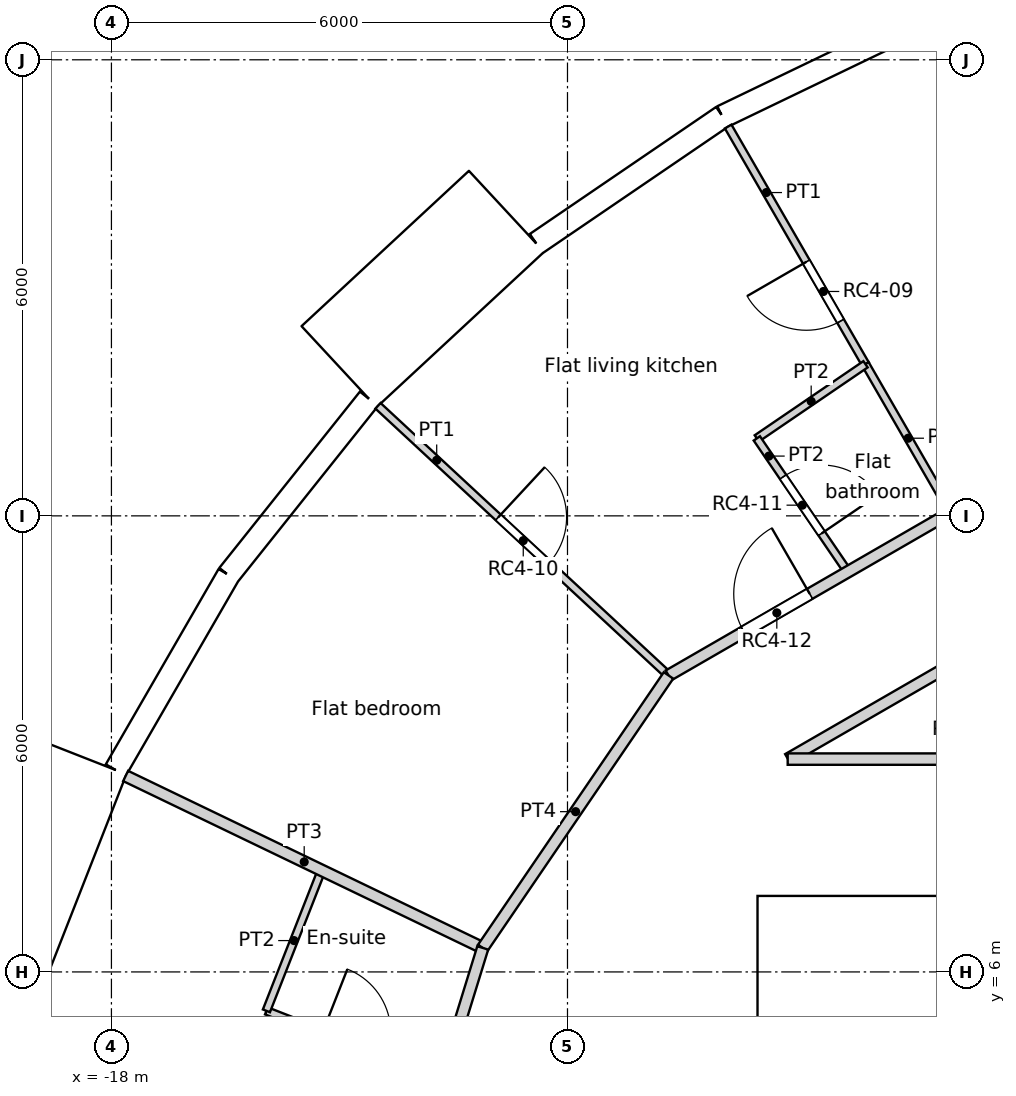
"""IFC4 building model, lengths in metres.
Left out: names, types, materials, properties, quantities, classifications, styles, units other than length and angle.
Written with IfcOpenShell. Run it as: python <this file> out.ifc"""

import sys

from ifc_helpers import new_model, si_unit, direction, frame, frame_2d, origin, origin_2d, place, context, subcontext, project, spatial, rectangle, circle, extrude, element, fill, save


model = new_model("IFC4")
c1 = context("Model", 3, precision=1e-05, world=origin(), true_north=direction((0.0, 1.0)))
c2 = subcontext(c1, "Body", "Model", "MODEL_VIEW")
j1 = project(units=[si_unit("LENGTHUNIT", "METRE"), si_unit("PLANEANGLEUNIT", "RADIAN")], contexts=[c1])
p1 = place(None, origin())
s1 = spatial("IfcSite", under=j1, at=p1, CompositionType="ELEMENT")
p2 = place(p1, origin())
s2 = spatial("IfcBuilding", under=s1, at=p2, CompositionType="ELEMENT")
p3 = place(p2, frame((0.0, 0.0, 263.4)))
s3 = spatial("IfcBuildingStorey", under=s2, at=p3, CompositionType="ELEMENT", Elevation=263.4)
for number, where, z_axis, x_axis in (
    (1, (-9.411, 16.301, 0.0), (0.0, 0.0, 1.0), (1.0, 0.0, 0.0)),
    (2, (-13.798, 12.802, 0.0), (0.0, 0.0, 1.0), (1.0, 0.0, 0.0)),
    (3, (-16.958, 8.167, 0.0), (0.0, 0.0, 1.0), (1.0, 0.0, 0.0)),
):
    element("IfcColumn", number, at=place(p3, frame(where, z_axis=z_axis, x_axis=x_axis)), inside=s3, PredefinedType="COLUMN", context=c2, shape_type="SweptSolid", body=[
        extrude(circle(Radius=0.55, at=origin_2d()), origin(), (0.0, 0.0, 1.0), 3.6),
    ])
p4 = place(p3, frame((-7.292, 18.538, 0.0), z_axis=(0.0, 0.0, 1.0), x_axis=(-0.90095513435, -0.433912255978, 0.0)))
e4 = element("IfcWall", 4, at=p4, inside=s3, PredefinedType="SOLIDWALL", context=c2, shape_type="SweptSolid", body=[
    extrude(rectangle(XDim=2.962, YDim=0.3, at=frame_2d((1.481, 0.0))), origin(), (0.0, 0.0, 1.0), 3.25),
])
p5 = place(p4, frame((1.481, 0.0, 1.55)))
e5 = element("IfcOpeningElement", 5, at=p5, cuts=e4, PredefinedType="OPENING", context=c2, shape_type="SweptSolid", body=[
    extrude(circle(Radius=0.9, at=origin_2d()), frame((0.0, 0.16, 0.0), z_axis=(0.0, -1.0, 0.0), x_axis=(1.0, 0.0, 0.0)), (0.0, 0.0, 1.0), 0.32),
])
p6 = place(p3, frame((-9.961, 17.253, 0.0), z_axis=(0.0, 0.0, 1.0), x_axis=(-0.826236061068, -0.563324037646, 0.0)))
e6 = element("IfcWall", 6, at=p6, inside=s3, PredefinedType="SOLIDWALL", context=c2, shape_type="SweptSolid", body=[
    extrude(rectangle(XDim=2.962, YDim=0.3, at=frame_2d((1.481, 0.0))), origin(), (0.0, 0.0, 1.0), 3.25),
])
p7 = place(p6, frame((1.481, 0.0, 1.55)))
e7 = element("IfcOpeningElement", 7, at=p7, cuts=e6, PredefinedType="OPENING", context=c2, shape_type="SweptSolid", body=[
    extrude(circle(Radius=0.9, at=origin_2d()), frame((0.0, 0.16, 0.0), z_axis=(0.0, -1.0, 0.0), x_axis=(1.0, 0.0, 0.0)), (0.0, 0.0, 1.0), 0.32),
])
p8 = place(p3, frame((-12.804, 16.005, -0.35), z_axis=(0.0, 0.0, 1.0), x_axis=(-0.733022439167, -0.680204457261, 0.0)))
e8 = element("IfcWall", 8, at=p8, inside=s3, PredefinedType="ELEMENTEDWALL", context=c2, shape_type="SweptSolid", body=[
    extrude(rectangle(XDim=3.0, YDim=1.45, at=frame_2d((1.5, 0.0))), origin(), (0.0, 0.0, 1.0), 3.6),
])
p9 = place(p8, frame((1.5, 0.0, 1.9)))
e9 = element("IfcOpeningElement", 9, at=p9, cuts=e8, PredefinedType="OPENING", context=c2, shape_type="SweptSolid", body=[
    extrude(circle(Radius=0.9, at=origin_2d()), frame((0.0, 0.735, 0.0), z_axis=(0.0, -1.0, 0.0), x_axis=(1.0, 0.0, 0.0)), (0.0, 0.0, 1.0), 1.47),
])
p10 = place(p3, frame((-14.613, 13.538, 0.0), z_axis=(0.0, 0.0, 1.0), x_axis=(-0.623498236992, -0.781824755599, 0.0)))
e10 = element("IfcWall", 10, at=p10, inside=s3, PredefinedType="SOLIDWALL", context=c2, shape_type="SweptSolid", body=[
    extrude(rectangle(XDim=2.962, YDim=0.3, at=frame_2d((1.481, 0.0))), origin(), (0.0, 0.0, 1.0), 3.25),
])
p11 = place(p10, frame((1.481, 0.0, 1.55)))
e11 = element("IfcOpeningElement", 11, at=p11, cuts=e10, PredefinedType="OPENING", context=c2, shape_type="SweptSolid", body=[
    extrude(circle(Radius=0.9, at=origin_2d()), frame((0.0, 0.16, 0.0), z_axis=(0.0, -1.0, 0.0), x_axis=(1.0, 0.0, 0.0)), (0.0, 0.0, 1.0), 0.32),
])
p12 = place(p3, frame((-16.46, 11.222, 0.0), z_axis=(0.0, 0.0, 1.0), x_axis=(-0.499950756475, -0.86605383268, 0.0)))
e12 = element("IfcWall", 12, at=p12, inside=s3, PredefinedType="SOLIDWALL", context=c2, shape_type="SweptSolid", body=[
    extrude(rectangle(XDim=2.962, YDim=0.3, at=frame_2d((1.481, 0.0))), origin(), (0.0, 0.0, 1.0), 3.25),
])
p13 = place(p12, frame((1.481, 0.0, 1.55)))
e13 = element("IfcOpeningElement", 13, at=p13, cuts=e12, PredefinedType="OPENING", context=c2, shape_type="SweptSolid", body=[
    extrude(circle(Radius=0.9, at=origin_2d()), frame((0.0, 0.16, 0.0), z_axis=(0.0, -1.0, 0.0), x_axis=(1.0, 0.0, 0.0)), (0.0, 0.0, 1.0), 0.32),
])
p14 = place(p3, frame((-18.48, 8.864, -0.35), z_axis=(0.0, 0.0, 1.0), x_axis=(-0.36537792632, -0.93085926485, 0.0)))
e14 = element("IfcWall", 14, at=p14, inside=s3, PredefinedType="ELEMENTEDWALL", context=c2, shape_type="SweptSolid", body=[
    extrude(rectangle(XDim=3.0, YDim=1.45, at=frame_2d((1.5, 0.0))), origin(), (0.0, 0.0, 1.0), 3.6),
])
p15 = place(p14, frame((1.5, 0.0, 1.9)))
e15 = element("IfcOpeningElement", 15, at=p15, cuts=e14, PredefinedType="OPENING", context=c2, shape_type="SweptSolid", body=[
    extrude(circle(Radius=0.9, at=origin_2d()), frame((0.0, 0.735, 0.0), z_axis=(0.0, -1.0, 0.0), x_axis=(1.0, 0.0, 0.0)), (0.0, 0.0, 1.0), 1.47),
])
p16 = place(p3, frame((-9.5, 6.7, 0.0), z_axis=(0.0, 0.0, 1.0), x_axis=(1.0, 0.0, 0.0)))
e16 = element("IfcWall", 16, at=p16, inside=s3, PredefinedType="SOLIDWALL", context=c2, shape_type="SweptSolid", body=[
    extrude(rectangle(XDim=19.0, YDim=0.6, at=frame_2d((9.5, 0.0))), origin(), (0.0, 0.0, 1.0), 3.6),
])
p17 = place(p16, frame((5.35, 0.0, 0.0)))
e17 = element("IfcOpeningElement", 17, at=p17, cuts=e16, PredefinedType="OPENING", context=c2, shape_type="SweptSolid", body=[
    extrude(rectangle(XDim=1.7, YDim=2.1, at=frame_2d((0.85, 1.05))), frame((0.0, 0.3, 0.0), z_axis=(0.0, -1.0, 0.0), x_axis=(1.0, 0.0, 0.0)), (0.0, 0.0, 1.0), 0.6),
])
p18 = place(p3, frame((-9.2, -6.4, 0.0), z_axis=(0.0, 0.0, 1.0), x_axis=(0.0, 1.0, 0.0)))
e18 = element("IfcWall", 18, at=p18, inside=s3, PredefinedType="SOLIDWALL", context=c2, shape_type="SweptSolid", body=[
    extrude(rectangle(XDim=12.8, YDim=0.6, at=frame_2d((6.4, 0.0))), origin(), (0.0, 0.0, 1.0), 3.6),
])
p19 = place(p3, frame((-9.103, 8.8, 0.0), z_axis=(0.0, 0.0, 1.0), x_axis=(1.0, 0.0, 0.0)))
e19 = element("IfcWall", 19, at=p19, inside=s3, PredefinedType="PARTITIONING", context=c2, shape_type="SweptSolid", body=[
    extrude(rectangle(XDim=9.663, YDim=0.15, at=frame_2d((4.832, 0.0))), origin(), (0.0, 0.0, 1.0), 3.25),
])
p20 = place(p19, frame((4.332, 0.0, 0.0)))
e20 = element("IfcOpeningElement", 20, at=p20, cuts=e19, PredefinedType="OPENING", context=c2, shape_type="SweptSolid", body=[
    extrude(rectangle(XDim=1.0, YDim=2.04, at=frame_2d((0.5, 1.02))), frame((0.0, 0.075, 0.0), z_axis=(0.0, -1.0, 0.0), x_axis=(1.0, 0.0, 0.0)), (0.0, 0.0, 1.0), 0.15),
])
p21 = place(p3, frame((-9.099, 8.801, 0.0), z_axis=(0.0, 0.0, 1.0), x_axis=(0.866068593998, 0.499925184894, 0.0)))
e21 = element("IfcWall", 21, at=p21, inside=s3, PredefinedType="PARTITIONING", context=c2, shape_type="SweptSolid", body=[
    extrude(rectangle(XDim=6.741, YDim=0.15, at=frame_2d((3.371, 0.0))), origin(), (0.0, 0.0, 1.0), 3.25),
])
p22 = place(p3, frame((-10.671, 9.901, 0.0), z_axis=(0.0, 0.0, 1.0), x_axis=(0.866021669971, 0.500006467099, 0.0)))
e22 = element("IfcWall", 22, at=p22, inside=s3, PredefinedType="PARTITIONING", context=c2, shape_type="SweptSolid", body=[
    extrude(rectangle(XDim=8.582, YDim=0.15, at=frame_2d((4.291, 0.0))), origin(), (0.0, 0.0, 1.0), 3.25),
])
p23 = place(p22, frame((1.146, 0.0, 0.0)))
e23 = element("IfcOpeningElement", 23, at=p23, cuts=e22, PredefinedType="OPENING", context=c2, shape_type="SweptSolid", body=[
    extrude(rectangle(XDim=1.0, YDim=2.1, at=frame_2d((0.5, 1.05))), frame((0.0, 0.075, 0.0), z_axis=(0.0, -1.0, 0.0), x_axis=(1.0, 0.0, 0.0)), (0.0, 0.0, 1.0), 0.15),
])
p24 = place(p3, frame((-13.115, 6.316, 0.0), z_axis=(0.0, 0.0, 1.0), x_axis=(0.563305396331, 0.826248770325, 0.0)))
e24 = element("IfcWall", 24, at=p24, inside=s3, PredefinedType="PARTITIONING", context=c2, shape_type="SweptSolid", body=[
    extrude(rectangle(XDim=4.339, YDim=0.15, at=frame_2d((2.169, 0.0))), origin(), (0.0, 0.0, 1.0), 3.25),
])
p25 = place(p3, frame((-14.394, 2.17, 0.0), z_axis=(0.0, 0.0, 1.0), x_axis=(0.294793541578, 0.955560970239, 0.0)))
e25 = element("IfcWall", 25, at=p25, inside=s3, PredefinedType="PARTITIONING", context=c2, shape_type="SweptSolid", body=[
    extrude(rectangle(XDim=4.339, YDim=0.15, at=frame_2d((2.169, 0.0))), origin(), (0.0, 0.0, 1.0), 3.25),
])
p26 = place(p25, frame((0.82, 0.0, 0.0)))
e26 = element("IfcOpeningElement", 26, at=p26, cuts=e25, PredefinedType="OPENING", context=c2, shape_type="SweptSolid", body=[
    extrude(rectangle(XDim=1.0, YDim=2.1, at=frame_2d((0.5, 1.05))), frame((0.0, 0.075, 0.0), z_axis=(0.0, -1.0, 0.0), x_axis=(1.0, 0.0, 0.0)), (0.0, 0.0, 1.0), 0.15),
])
p27 = place(p3, frame((-9.886, 17.122, 0.0), z_axis=(0.0, 0.0, 1.0), x_axis=(0.500172881213, -0.865925567759, 0.0)))
e27 = element("IfcWall", 27, at=p27, inside=s3, PredefinedType="PARTITIONING", context=c2, shape_type="SweptSolid", body=[
    extrude(rectangle(XDim=3.613, YDim=0.1, at=frame_2d((1.806, 0.0))), origin(), (0.0, 0.0, 1.0), 3.25),
])
p28 = place(p27, frame((2.056, 0.0, 0.0)))
e28 = element("IfcOpeningElement", 28, at=p28, cuts=e27, PredefinedType="OPENING", context=c2, shape_type="SweptSolid", body=[
    extrude(rectangle(XDim=0.9, YDim=2.1, at=frame_2d((0.45, 1.05))), frame((0.0, 0.05, 0.0), z_axis=(0.0, -1.0, 0.0), x_axis=(1.0, 0.0, 0.0)), (0.0, 0.0, 1.0), 0.1),
])
p29 = place(p3, frame((-14.493, 13.448, 0.0), z_axis=(0.0, 0.0, 1.0), x_axis=(0.732975231717, -0.680255326836, 0.0)))
e29 = element("IfcWall", 29, at=p29, inside=s3, PredefinedType="PARTITIONING", context=c2, shape_type="SweptSolid", body=[
    extrude(rectangle(XDim=5.214, YDim=0.1, at=frame_2d((2.607, 0.0))), origin(), (0.0, 0.0, 1.0), 3.25),
])
p30 = place(p29, frame((2.157, 0.0, 0.0)))
e30 = element("IfcOpeningElement", 30, at=p30, cuts=e29, PredefinedType="OPENING", context=c2, shape_type="SweptSolid", body=[
    extrude(rectangle(XDim=0.9, YDim=2.1, at=frame_2d((0.45, 1.05))), frame((0.0, 0.05, 0.0), z_axis=(0.0, -1.0, 0.0), x_axis=(1.0, 0.0, 0.0)), (0.0, 0.0, 1.0), 0.1),
])
p31 = place(p3, frame((-9.509, 13.019, 0.0), z_axis=(0.0, 0.0, 1.0), x_axis=(0.826254203104, 0.563297427522, 0.0)))
e31 = element("IfcWall", 31, at=p31, inside=s3, PredefinedType="PARTITIONING", context=c2, shape_type="SweptSolid", body=[
    extrude(rectangle(XDim=1.731, YDim=0.1, at=frame_2d((0.865, 0.0))), origin(), (0.0, 0.0, 1.0), 3.25),
])
p32 = place(p3, frame((-9.509, 13.019, 0.0), z_axis=(0.0, 0.0, 1.0), x_axis=(0.563233448692, -0.826297816937, 0.0)))
e32 = element("IfcWall", 32, at=p32, inside=s3, PredefinedType="PARTITIONING", context=c2, shape_type="SweptSolid", body=[
    extrude(rectangle(XDim=2.125, YDim=0.1, at=frame_2d((1.062, 0.0))), origin(), (0.0, 0.0, 1.0), 3.25),
])
p33 = place(p32, frame((0.613, 0.0, 0.0)))
e33 = element("IfcOpeningElement", 33, at=p33, cuts=e32, PredefinedType="OPENING", context=c2, shape_type="SweptSolid", body=[
    extrude(rectangle(XDim=0.9, YDim=2.0, at=frame_2d((0.45, 1.0))), frame((0.0, 0.05, 0.0), z_axis=(0.0, -1.0, 0.0), x_axis=(1.0, 0.0, 0.0)), (0.0, 0.0, 1.0), 0.1),
])
p34 = place(p3, frame((-8.081, 13.997, 0.0), z_axis=(0.0, 0.0, 1.0), x_axis=(0.49982252503, -0.866127844762, 0.0)))
e34 = element("IfcWall", 34, at=p34, inside=s3, PredefinedType="PARTITIONING", context=c2, shape_type="SweptSolid", body=[
    extrude(rectangle(XDim=2.253, YDim=0.1, at=frame_2d((1.126, 0.0))), origin(), (0.0, 0.0, 1.0), 3.25),
])
p35 = place(p3, frame((-17.813, 8.578, 0.0), z_axis=(0.0, 0.0, 1.0), x_axis=(0.901040981828, -0.433733961164, 0.0)))
e35 = element("IfcWall", 35, at=p35, inside=s3, PredefinedType="PARTITIONING", context=c2, shape_type="SweptSolid", body=[
    extrude(rectangle(XDim=5.214, YDim=0.15, at=frame_2d((2.607, 0.0))), origin(), (0.0, 0.0, 1.0), 3.25),
])
p36 = place(p3, frame((-15.961, 5.488, 0.0), z_axis=(0.0, 0.0, 1.0), x_axis=(0.365427989951, 0.930839612479, 0.0)))
e36 = element("IfcWall", 36, at=p36, inside=s3, PredefinedType="PARTITIONING", context=c2, shape_type="SweptSolid", body=[
    extrude(rectangle(XDim=1.986, YDim=0.1, at=frame_2d((0.993, 0.0))), origin(), (0.0, 0.0, 1.0), 3.25),
])
p37 = place(p3, frame((-15.961, 5.488, 0.0), z_axis=(0.0, 0.0, 1.0), x_axis=(0.930878137474, -0.365329841614, 0.0)))
e37 = element("IfcWall", 37, at=p37, inside=s3, PredefinedType="PARTITIONING", context=c2, shape_type="SweptSolid", body=[
    extrude(rectangle(XDim=2.483, YDim=0.1, at=frame_2d((1.241, 0.0))), origin(), (0.0, 0.0, 1.0), 3.25),
])
p38 = place(p37, frame((0.791, 0.0, 0.0)))
e38 = element("IfcOpeningElement", 38, at=p38, cuts=e37, PredefinedType="OPENING", context=c2, shape_type="SweptSolid", body=[
    extrude(rectangle(XDim=0.9, YDim=2.04, at=frame_2d((0.45, 1.02))), frame((0.0, 0.05, 0.0), z_axis=(0.0, -1.0, 0.0), x_axis=(1.0, 0.0, 0.0)), (0.0, 0.0, 1.0), 0.1),
])
p39 = place(p5, origin())
e39 = element("IfcWindow", 39, at=p39, inside=s3, PartitioningType="SINGLE_PANEL", PredefinedType="WINDOW", context=c2, shape_type="SweptSolid", body=[
    extrude(circle(Radius=0.9, at=origin_2d()), frame((0.0, 0.12, 0.0), z_axis=(0.0, -1.0, 0.0), x_axis=(1.0, 0.0, 0.0)), (0.0, 0.0, 1.0), 0.1),
])
fill(e5, e39)
p40 = place(p7, origin())
e40 = element("IfcWindow", 40, at=p40, inside=s3, PartitioningType="SINGLE_PANEL", PredefinedType="WINDOW", context=c2, shape_type="SweptSolid", body=[
    extrude(circle(Radius=0.9, at=origin_2d()), frame((0.0, 0.12, 0.0), z_axis=(0.0, -1.0, 0.0), x_axis=(1.0, 0.0, 0.0)), (0.0, 0.0, 1.0), 0.1),
])
fill(e7, e40)
p41 = place(p9, origin())
e41 = element("IfcWindow", 41, at=p41, inside=s3, PartitioningType="SINGLE_PANEL", PredefinedType="WINDOW", context=c2, shape_type="SweptSolid", body=[
    extrude(circle(Radius=0.9, at=origin_2d()), frame((0.0, 0.695, 0.0), z_axis=(0.0, -1.0, 0.0), x_axis=(1.0, 0.0, 0.0)), (0.0, 0.0, 1.0), 0.1),
])
fill(e9, e41)
p42 = place(p11, origin())
e42 = element("IfcWindow", 42, at=p42, inside=s3, PartitioningType="SINGLE_PANEL", PredefinedType="WINDOW", context=c2, shape_type="SweptSolid", body=[
    extrude(circle(Radius=0.9, at=origin_2d()), frame((0.0, 0.12, 0.0), z_axis=(0.0, -1.0, 0.0), x_axis=(1.0, 0.0, 0.0)), (0.0, 0.0, 1.0), 0.1),
])
fill(e11, e42)
p43 = place(p13, origin())
e43 = element("IfcWindow", 43, at=p43, inside=s3, PartitioningType="SINGLE_PANEL", PredefinedType="WINDOW", context=c2, shape_type="SweptSolid", body=[
    extrude(circle(Radius=0.9, at=origin_2d()), frame((0.0, 0.12, 0.0), z_axis=(0.0, -1.0, 0.0), x_axis=(1.0, 0.0, 0.0)), (0.0, 0.0, 1.0), 0.1),
])
fill(e13, e43)
p44 = place(p15, origin())
e44 = element("IfcWindow", 44, at=p44, inside=s3, PartitioningType="SINGLE_PANEL", PredefinedType="WINDOW", context=c2, shape_type="SweptSolid", body=[
    extrude(circle(Radius=0.9, at=origin_2d()), frame((0.0, 0.695, 0.0), z_axis=(0.0, -1.0, 0.0), x_axis=(1.0, 0.0, 0.0)), (0.0, 0.0, 1.0), 0.1),
])
fill(e15, e44)
p45 = place(p28, origin())
e45 = element("IfcDoor", 45, at=p45, inside=s3, OperationType="SINGLE_SWING_RIGHT", PredefinedType="DOOR", context=c2, shape_type="SweptSolid", body=[
    extrude(rectangle(XDim=0.9, YDim=2.1, at=frame_2d((0.45, 1.05))), frame((0.0, 0.025, 0.0), z_axis=(0.0, -1.0, 0.0), x_axis=(1.0, 0.0, 0.0)), (0.0, 0.0, 1.0), 0.05),
])
fill(e28, e45)
p46 = place(p30, origin())
e46 = element("IfcDoor", 46, at=p46, inside=s3, OperationType="SINGLE_SWING_LEFT", PredefinedType="DOOR", context=c2, shape_type="SweptSolid", body=[
    extrude(rectangle(XDim=0.9, YDim=2.1, at=frame_2d((0.45, 1.05))), frame((0.0, 0.025, 0.0), z_axis=(0.0, -1.0, 0.0), x_axis=(1.0, 0.0, 0.0)), (0.0, 0.0, 1.0), 0.05),
])
fill(e30, e46)
p47 = place(p33, origin())
e47 = element("IfcDoor", 47, at=p47, inside=s3, OperationType="SINGLE_SWING_RIGHT", PredefinedType="DOOR", context=c2, shape_type="SweptSolid", body=[
    extrude(rectangle(XDim=0.9, YDim=2.0, at=frame_2d((0.45, 1.0))), frame((0.0, 0.025, 0.0), z_axis=(0.0, -1.0, 0.0), x_axis=(1.0, 0.0, 0.0)), (0.0, 0.0, 1.0), 0.05),
])
fill(e33, e47)
p48 = place(p23, origin())
e48 = element("IfcDoor", 48, at=p48, inside=s3, OperationType="SINGLE_SWING_RIGHT", PredefinedType="DOOR", context=c2, shape_type="SweptSolid", body=[
    extrude(rectangle(XDim=1.0, YDim=2.1, at=frame_2d((0.5, 1.05))), frame((0.0, 0.025, 0.0), z_axis=(0.0, -1.0, 0.0), x_axis=(1.0, 0.0, 0.0)), (0.0, 0.0, 1.0), 0.05),
])
fill(e23, e48)
save(model, sys.argv[1])
